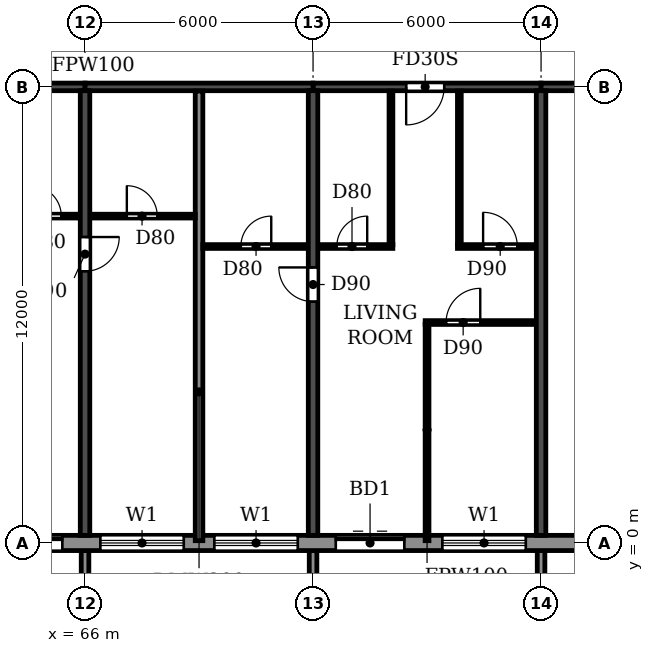
"""IFC4 building model, lengths in metres.
Left out: names, types, materials, properties, quantities, classifications, styles, units other than length and angle.
Written with IfcOpenShell. Run it as: python <this file> out.ifc"""

import sys

from ifc_helpers import new_model, si_unit, direction, frame, frame_2d, origin, place, context, subcontext, project, spatial, polyline, rectangle, outline, extrude, source, transform, mapped, element, fill, save


model = new_model("IFC4")
c1 = context("Model", 3, precision=1e-05, world=origin(), true_north=direction((0.0, 1.0)))
c2 = subcontext(c1, "Body", "Model", "MODEL_VIEW")
j1 = project(units=[si_unit("LENGTHUNIT", "METRE"), si_unit("PLANEANGLEUNIT", "RADIAN")], contexts=[c1])
p1 = place(None, origin())
s1 = spatial("IfcSite", under=j1, at=p1, CompositionType="ELEMENT")
p2 = place(p1, origin())
s2 = spatial("IfcBuilding", under=s1, at=p2, CompositionType="ELEMENT")
p3 = place(p2, frame((0.0, 0.0, 191.7)))
s3 = spatial("IfcBuildingStorey", under=s2, at=p3, CompositionType="ELEMENT", Elevation=191.7)
p4 = place(p3, frame((66.0, 0.2, 0.0), z_axis=(0.0, 0.0, 1.0), x_axis=(0.0, 1.0, 0.0)))
e1 = element("IfcWall", 1, at=p4, inside=s3, PredefinedType="SHEAR", context=c2, shape_type="SweptSolid", body=[
    extrude(rectangle(XDim=11.7, YDim=0.25, at=frame_2d((5.85, 0.0))), origin(), (0.0, 0.0, 1.0), 3.08),
])
p5 = place(p4, frame((6.95, 0.0, 0.0)))
e2 = element("IfcOpeningElement", 2, at=p5, cuts=e1, PredefinedType="OPENING", context=c2, shape_type="SweptSolid", body=[
    extrude(rectangle(XDim=0.9, YDim=2.1, at=frame_2d((0.45, 1.05))), frame((0.0, 0.135, 0.0), z_axis=(0.0, -1.0, 0.0), x_axis=(1.0, 0.0, 0.0)), (0.0, 0.0, 1.0), 0.27),
])
p6 = place(p3, frame((72.0, 0.2, 0.0), z_axis=(0.0, 0.0, 1.0), x_axis=(0.0, 1.0, 0.0)))
e3 = element("IfcWall", 3, at=p6, inside=s3, PredefinedType="SHEAR", context=c2, shape_type="SweptSolid", body=[
    extrude(rectangle(XDim=11.7, YDim=0.25, at=frame_2d((5.85, 0.0))), origin(), (0.0, 0.0, 1.0), 3.08),
])
p7 = place(p6, frame((6.15, 0.0, 0.0)))
e4 = element("IfcOpeningElement", 4, at=p7, cuts=e3, PredefinedType="OPENING", context=c2, shape_type="SweptSolid", body=[
    extrude(rectangle(XDim=0.9, YDim=2.1, at=frame_2d((0.45, 1.05))), frame((0.0, 0.135, 0.0), z_axis=(0.0, -1.0, 0.0), x_axis=(1.0, 0.0, 0.0)), (0.0, 0.0, 1.0), 0.27),
])
p8 = place(p3, frame((78.0, 0.2, 0.0), z_axis=(0.0, 0.0, 1.0), x_axis=(0.0, 1.0, 0.0)))
e5 = element("IfcWall", 5, at=p8, inside=s3, PredefinedType="SHEAR", context=c2, shape_type="SweptSolid", body=[
    extrude(rectangle(XDim=11.7, YDim=0.25, at=frame_2d((5.85, 0.0))), origin(), (0.0, 0.0, 1.0), 3.08),
])
p9 = place(p3, frame((60.0, 12.0, 0.0), z_axis=(0.0, 0.0, 1.0), x_axis=(1.0, 0.0, 0.0)))
e6 = element("IfcWall", 6, at=p9, inside=s3, PredefinedType="SHEAR", context=c2, shape_type="SweptSolid", body=[
    extrude(rectangle(XDim=6.0, YDim=0.2, at=frame_2d((3.0, 0.0))), origin(), (0.0, 0.0, 1.0), 2.48),
])
p10 = place(p9, frame((2.55, 0.0, 0.0)))
e7 = element("IfcOpeningElement", 7, at=p10, cuts=e6, PredefinedType="OPENING", context=c2, shape_type="SweptSolid", body=[
    extrude(rectangle(XDim=1.0, YDim=2.1, at=frame_2d((0.5, 1.05))), frame((0.0, 0.11, 0.0), z_axis=(0.0, -1.0, 0.0), x_axis=(1.0, 0.0, 0.0)), (0.0, 0.0, 1.0), 0.22),
])
p11 = place(p3, frame((66.0, 12.0, 0.0), z_axis=(0.0, 0.0, 1.0), x_axis=(1.0, 0.0, 0.0)))
e8 = element("IfcWall", 8, at=p11, inside=s3, PredefinedType="SHEAR", context=c2, shape_type="SweptSolid", body=[
    extrude(rectangle(XDim=6.0, YDim=0.2, at=frame_2d((3.0, 0.0))), origin(), (0.0, 0.0, 1.0), 2.48),
])
p12 = place(p3, frame((72.0, 12.0, 0.0), z_axis=(0.0, 0.0, 1.0), x_axis=(1.0, 0.0, 0.0)))
e9 = element("IfcWall", 9, at=p12, inside=s3, PredefinedType="SHEAR", context=c2, shape_type="SweptSolid", body=[
    extrude(rectangle(XDim=6.0, YDim=0.2, at=frame_2d((3.0, 0.0))), origin(), (0.0, 0.0, 1.0), 2.48),
])
p13 = place(p12, frame((2.45, 0.0, 0.0)))
e10 = element("IfcOpeningElement", 10, at=p13, cuts=e9, PredefinedType="OPENING", context=c2, shape_type="SweptSolid", body=[
    extrude(rectangle(XDim=1.0, YDim=2.1, at=frame_2d((0.5, 1.05))), frame((0.0, 0.11, 0.0), z_axis=(0.0, -1.0, 0.0), x_axis=(1.0, 0.0, 0.0)), (0.0, 0.0, 1.0), 0.22),
])
p14 = place(p3, frame((78.0, 12.0, 0.0), z_axis=(0.0, 0.0, 1.0), x_axis=(1.0, 0.0, 0.0)))
e11 = element("IfcWall", 11, at=p14, inside=s3, PredefinedType="SHEAR", context=c2, shape_type="SweptSolid", body=[
    extrude(rectangle(XDim=5.8, YDim=0.2, at=frame_2d((2.9, 0.0))), origin(), (0.0, 0.0, 1.0), 2.48),
])
p15 = place(p14, frame((2.5, 0.0, 0.0)))
e12 = element("IfcOpeningElement", 12, at=p15, cuts=e11, PredefinedType="OPENING", context=c2, shape_type="SweptSolid", body=[
    extrude(rectangle(XDim=1.0, YDim=2.1, at=frame_2d((0.5, 1.05))), frame((0.0, 0.11, 0.0), z_axis=(0.0, -1.0, 0.0), x_axis=(1.0, 0.0, 0.0)), (0.0, 0.0, 1.0), 0.22),
])
p16 = place(p3, frame((22.683, 0.0, 0.0), z_axis=(0.0, 0.0, 1.0), x_axis=(1.0, 0.0, 0.0)))
e13 = element("IfcWall", 13, at=p16, inside=s3, PredefinedType="STANDARD", context=c2, shape_type="SweptSolid", body=[
    extrude(rectangle(XDim=56.634, YDim=0.4, at=frame_2d((28.317, 0.0))), origin(), (0.0, 0.0, 1.0), 3.08),
])
p17 = place(p16, frame((1.717, 0.0, 0.9)))
e14 = element("IfcOpeningElement", 14, at=p17, cuts=e13, PredefinedType="OPENING", context=c2, shape_type="SweptSolid", body=[
    extrude(rectangle(XDim=2.2, YDim=1.5, at=frame_2d((1.1, 0.75))), frame((0.0, 0.21, 0.0), z_axis=(0.0, -1.0, 0.0), x_axis=(1.0, 0.0, 0.0)), (0.0, 0.0, 1.0), 0.42),
])
p18 = place(p16, frame((4.917, 0.0, 0.0)))
e15 = element("IfcOpeningElement", 15, at=p18, cuts=e13, PredefinedType="OPENING", context=c2, shape_type="SweptSolid", body=[
    extrude(rectangle(XDim=1.8, YDim=2.4, at=frame_2d((0.9, 1.2))), frame((0.0, 0.21, 0.0), z_axis=(0.0, -1.0, 0.0), x_axis=(1.0, 0.0, 0.0)), (0.0, 0.0, 1.0), 0.42),
])
p19 = place(p16, frame((7.717, 0.0, 0.9)))
e16 = element("IfcOpeningElement", 16, at=p19, cuts=e13, PredefinedType="OPENING", context=c2, shape_type="SweptSolid", body=[
    extrude(rectangle(XDim=2.2, YDim=1.5, at=frame_2d((1.1, 0.75))), frame((0.0, 0.21, 0.0), z_axis=(0.0, -1.0, 0.0), x_axis=(1.0, 0.0, 0.0)), (0.0, 0.0, 1.0), 0.42),
])
p20 = place(p16, frame((10.717, 0.0, 0.9)))
e17 = element("IfcOpeningElement", 17, at=p20, cuts=e13, PredefinedType="OPENING", context=c2, shape_type="SweptSolid", body=[
    extrude(rectangle(XDim=2.2, YDim=1.5, at=frame_2d((1.1, 0.75))), frame((0.0, 0.21, 0.0), z_axis=(0.0, -1.0, 0.0), x_axis=(1.0, 0.0, 0.0)), (0.0, 0.0, 1.0), 0.42),
])
p21 = place(p16, frame((13.717, 0.0, 0.9)))
e18 = element("IfcOpeningElement", 18, at=p21, cuts=e13, PredefinedType="OPENING", context=c2, shape_type="SweptSolid", body=[
    extrude(rectangle(XDim=2.2, YDim=1.5, at=frame_2d((1.1, 0.75))), frame((0.0, 0.21, 0.0), z_axis=(0.0, -1.0, 0.0), x_axis=(1.0, 0.0, 0.0)), (0.0, 0.0, 1.0), 0.42),
])
p22 = place(p16, frame((16.917, 0.0, 0.0)))
e19 = element("IfcOpeningElement", 19, at=p22, cuts=e13, PredefinedType="OPENING", context=c2, shape_type="SweptSolid", body=[
    extrude(rectangle(XDim=1.8, YDim=2.4, at=frame_2d((0.9, 1.2))), frame((0.0, 0.21, 0.0), z_axis=(0.0, -1.0, 0.0), x_axis=(1.0, 0.0, 0.0)), (0.0, 0.0, 1.0), 0.42),
])
p23 = place(p16, frame((19.717, 0.0, 0.9)))
e20 = element("IfcOpeningElement", 20, at=p23, cuts=e13, PredefinedType="OPENING", context=c2, shape_type="SweptSolid", body=[
    extrude(rectangle(XDim=2.2, YDim=1.5, at=frame_2d((1.1, 0.75))), frame((0.0, 0.21, 0.0), z_axis=(0.0, -1.0, 0.0), x_axis=(1.0, 0.0, 0.0)), (0.0, 0.0, 1.0), 0.42),
])
p24 = place(p16, frame((22.717, 0.0, 0.9)))
e21 = element("IfcOpeningElement", 21, at=p24, cuts=e13, PredefinedType="OPENING", context=c2, shape_type="SweptSolid", body=[
    extrude(rectangle(XDim=2.2, YDim=1.5, at=frame_2d((1.1, 0.75))), frame((0.0, 0.21, 0.0), z_axis=(0.0, -1.0, 0.0), x_axis=(1.0, 0.0, 0.0)), (0.0, 0.0, 1.0), 0.42),
])
p25 = place(p16, frame((25.917, 0.0, 0.0)))
e22 = element("IfcOpeningElement", 22, at=p25, cuts=e13, PredefinedType="OPENING", context=c2, shape_type="SweptSolid", body=[
    extrude(rectangle(XDim=1.8, YDim=2.4, at=frame_2d((0.9, 1.2))), frame((0.0, 0.21, 0.0), z_axis=(0.0, -1.0, 0.0), x_axis=(1.0, 0.0, 0.0)), (0.0, 0.0, 1.0), 0.42),
])
p26 = place(p16, frame((28.717, 0.0, 0.9)))
e23 = element("IfcOpeningElement", 23, at=p26, cuts=e13, PredefinedType="OPENING", context=c2, shape_type="SweptSolid", body=[
    extrude(rectangle(XDim=2.2, YDim=1.5, at=frame_2d((1.1, 0.75))), frame((0.0, 0.21, 0.0), z_axis=(0.0, -1.0, 0.0), x_axis=(1.0, 0.0, 0.0)), (0.0, 0.0, 1.0), 0.42),
])
p27 = place(p16, frame((31.717, 0.0, 0.9)))
e24 = element("IfcOpeningElement", 24, at=p27, cuts=e13, PredefinedType="OPENING", context=c2, shape_type="SweptSolid", body=[
    extrude(rectangle(XDim=2.2, YDim=1.5, at=frame_2d((1.1, 0.75))), frame((0.0, 0.21, 0.0), z_axis=(0.0, -1.0, 0.0), x_axis=(1.0, 0.0, 0.0)), (0.0, 0.0, 1.0), 0.42),
])
p28 = place(p16, frame((34.717, 0.0, 0.9)))
e25 = element("IfcOpeningElement", 25, at=p28, cuts=e13, PredefinedType="OPENING", context=c2, shape_type="SweptSolid", body=[
    extrude(rectangle(XDim=2.2, YDim=1.5, at=frame_2d((1.1, 0.75))), frame((0.0, 0.21, 0.0), z_axis=(0.0, -1.0, 0.0), x_axis=(1.0, 0.0, 0.0)), (0.0, 0.0, 1.0), 0.42),
])
p29 = place(p16, frame((37.717, 0.0, 0.9)))
e26 = element("IfcOpeningElement", 26, at=p29, cuts=e13, PredefinedType="OPENING", context=c2, shape_type="SweptSolid", body=[
    extrude(rectangle(XDim=2.2, YDim=1.5, at=frame_2d((1.1, 0.75))), frame((0.0, 0.21, 0.0), z_axis=(0.0, -1.0, 0.0), x_axis=(1.0, 0.0, 0.0)), (0.0, 0.0, 1.0), 0.42),
])
p30 = place(p16, frame((40.917, 0.0, 0.0)))
e27 = element("IfcOpeningElement", 27, at=p30, cuts=e13, PredefinedType="OPENING", context=c2, shape_type="SweptSolid", body=[
    extrude(rectangle(XDim=1.8, YDim=2.4, at=frame_2d((0.9, 1.2))), frame((0.0, 0.21, 0.0), z_axis=(0.0, -1.0, 0.0), x_axis=(1.0, 0.0, 0.0)), (0.0, 0.0, 1.0), 0.42),
])
p31 = place(p16, frame((43.717, 0.0, 0.9)))
e28 = element("IfcOpeningElement", 28, at=p31, cuts=e13, PredefinedType="OPENING", context=c2, shape_type="SweptSolid", body=[
    extrude(rectangle(XDim=2.2, YDim=1.5, at=frame_2d((1.1, 0.75))), frame((0.0, 0.21, 0.0), z_axis=(0.0, -1.0, 0.0), x_axis=(1.0, 0.0, 0.0)), (0.0, 0.0, 1.0), 0.42),
])
p32 = place(p16, frame((46.717, 0.0, 0.9)))
e29 = element("IfcOpeningElement", 29, at=p32, cuts=e13, PredefinedType="OPENING", context=c2, shape_type="SweptSolid", body=[
    extrude(rectangle(XDim=2.2, YDim=1.5, at=frame_2d((1.1, 0.75))), frame((0.0, 0.21, 0.0), z_axis=(0.0, -1.0, 0.0), x_axis=(1.0, 0.0, 0.0)), (0.0, 0.0, 1.0), 0.42),
])
p33 = place(p16, frame((49.917, 0.0, 0.0)))
e30 = element("IfcOpeningElement", 30, at=p33, cuts=e13, PredefinedType="OPENING", context=c2, shape_type="SweptSolid", body=[
    extrude(rectangle(XDim=1.8, YDim=2.4, at=frame_2d((0.9, 1.2))), frame((0.0, 0.21, 0.0), z_axis=(0.0, -1.0, 0.0), x_axis=(1.0, 0.0, 0.0)), (0.0, 0.0, 1.0), 0.42),
])
p34 = place(p16, frame((52.717, 0.0, 0.9)))
e31 = element("IfcOpeningElement", 31, at=p34, cuts=e13, PredefinedType="OPENING", context=c2, shape_type="SweptSolid", body=[
    extrude(rectangle(XDim=2.2, YDim=1.5, at=frame_2d((1.1, 0.75))), frame((0.0, 0.21, 0.0), z_axis=(0.0, -1.0, 0.0), x_axis=(1.0, 0.0, 0.0)), (0.0, 0.0, 1.0), 0.42),
])
m1 = source(origin(), c2, "Body", "SweptSolid", [
    extrude(outline(polyline([(0.0, 0.0), (0.2, 0.0), (0.2, 1.65), (0.0, 1.65), (0.0, 0.0)])), origin(), (0.0, 0.0, 1.0), 3.1),
])
for number, where in (
    (32, (65.9, -1.85, 0.0)),
    (33, (71.9, -1.85, 0.0)),
    (34, (77.9, -1.85, 0.0)),
):
    element("IfcWall", number, at=place(p3, frame(where)), inside=s3, PredefinedType="STANDARD", context=c2, shape_type="MappedRepresentation", body=[
        mapped(m1, transform((0.0, 0.0, 0.0))),
    ])
p35 = place(p3, frame((69.0, 0.06, 0.0), z_axis=(0.0, 0.0, 1.0), x_axis=(0.0, 1.0, 0.0)))
e35 = element("IfcWall", 35, at=p35, inside=s3, PredefinedType="PARTITIONING", context=c2, shape_type="SweptSolid", body=[
    extrude(rectangle(XDim=11.83, YDim=0.2, at=frame_2d((5.915, 0.0))), origin(), (0.0, 0.0, 1.0), 3.08),
])
p36 = place(p3, frame((74.95, 5.8, 0.0), z_axis=(0.0, 0.0, 1.0), x_axis=(1.0, 0.0, 0.0)))
e36 = element("IfcWall", 36, at=p36, inside=s3, PredefinedType="PARTITIONING", context=c2, shape_type="SweptSolid", body=[
    extrude(rectangle(XDim=2.915, YDim=0.1, at=frame_2d((1.458, 0.0))), origin(), (0.0, 0.0, 1.0), 3.08),
])
p37 = place(p36, frame((0.55, 0.0, 0.0)))
e37 = element("IfcOpeningElement", 37, at=p37, cuts=e36, PredefinedType="OPENING", context=c2, shape_type="SweptSolid", body=[
    extrude(rectangle(XDim=0.9, YDim=2.1, at=frame_2d((0.45, 1.05))), frame((0.0, 0.06, 0.0), z_axis=(0.0, -1.0, 0.0), x_axis=(1.0, 0.0, 0.0)), (0.0, 0.0, 1.0), 0.12),
])
p38 = place(p3, frame((69.1, 7.8, 0.0), z_axis=(0.0, 0.0, 1.0), x_axis=(1.0, 0.0, 0.0)))
e38 = element("IfcWall", 38, at=p38, inside=s3, PredefinedType="PARTITIONING", context=c2, shape_type="SweptSolid", body=[
    extrude(rectangle(XDim=2.765, YDim=0.1, at=frame_2d((1.382, 0.0))), origin(), (0.0, 0.0, 1.0), 3.08),
])
p39 = place(p38, frame((1.0, 0.0, 0.0)))
e39 = element("IfcOpeningElement", 39, at=p39, cuts=e38, PredefinedType="OPENING", context=c2, shape_type="SweptSolid", body=[
    extrude(rectangle(XDim=0.8, YDim=2.1, at=frame_2d((0.4, 1.05))), frame((0.0, 0.06, 0.0), z_axis=(0.0, -1.0, 0.0), x_axis=(1.0, 0.0, 0.0)), (0.0, 0.0, 1.0), 0.12),
])
p40 = place(p3, frame((72.135, 7.8, 0.0), z_axis=(0.0, 0.0, 1.0), x_axis=(1.0, 0.0, 0.0)))
e40 = element("IfcWall", 40, at=p40, inside=s3, PredefinedType="PARTITIONING", context=c2, shape_type="SweptSolid", body=[
    extrude(rectangle(XDim=1.965, YDim=0.1, at=frame_2d((0.982, 0.0))), origin(), (0.0, 0.0, 1.0), 3.08),
])
p41 = place(p40, frame((0.49, 0.0, 0.0)))
e41 = element("IfcOpeningElement", 41, at=p41, cuts=e40, PredefinedType="OPENING", context=c2, shape_type="SweptSolid", body=[
    extrude(rectangle(XDim=0.8, YDim=2.1, at=frame_2d((0.4, 1.05))), frame((0.0, 0.06, 0.0), z_axis=(0.0, -1.0, 0.0), x_axis=(1.0, 0.0, 0.0)), (0.0, 0.0, 1.0), 0.12),
])
p42 = place(p3, frame((75.8, 7.8, 0.0), z_axis=(0.0, 0.0, 1.0), x_axis=(1.0, 0.0, 0.0)))
e42 = element("IfcWall", 42, at=p42, inside=s3, PredefinedType="PARTITIONING", context=c2, shape_type="SweptSolid", body=[
    extrude(rectangle(XDim=2.065, YDim=0.1, at=frame_2d((1.032, 0.0))), origin(), (0.0, 0.0, 1.0), 3.08),
])
p43 = place(p42, frame((0.675, 0.0, 0.0)))
e43 = element("IfcOpeningElement", 43, at=p43, cuts=e42, PredefinedType="OPENING", context=c2, shape_type="SweptSolid", body=[
    extrude(rectangle(XDim=0.9, YDim=2.1, at=frame_2d((0.45, 1.05))), frame((0.0, 0.06, 0.0), z_axis=(0.0, -1.0, 0.0), x_axis=(1.0, 0.0, 0.0)), (0.0, 0.0, 1.0), 0.12),
])
p44 = place(p3, frame((63.9, 8.6, 0.0), z_axis=(0.0, 0.0, 1.0), x_axis=(1.0, 0.0, 0.0)))
e44 = element("IfcWall", 44, at=p44, inside=s3, PredefinedType="PARTITIONING", context=c2, shape_type="SweptSolid", body=[
    extrude(rectangle(XDim=1.965, YDim=0.1, at=frame_2d((0.982, 0.0))), origin(), (0.0, 0.0, 1.0), 3.08),
])
p45 = place(p44, frame((0.675, 0.0, 0.0)))
e45 = element("IfcOpeningElement", 45, at=p45, cuts=e44, PredefinedType="OPENING", context=c2, shape_type="SweptSolid", body=[
    extrude(rectangle(XDim=0.8, YDim=2.1, at=frame_2d((0.4, 1.05))), frame((0.0, 0.06, 0.0), z_axis=(0.0, -1.0, 0.0), x_axis=(1.0, 0.0, 0.0)), (0.0, 0.0, 1.0), 0.12),
])
p46 = place(p3, frame((66.135, 8.6, 0.0), z_axis=(0.0, 0.0, 1.0), x_axis=(1.0, 0.0, 0.0)))
e46 = element("IfcWall", 46, at=p46, inside=s3, PredefinedType="PARTITIONING", context=c2, shape_type="SweptSolid", body=[
    extrude(rectangle(XDim=2.765, YDim=0.1, at=frame_2d((1.382, 0.0))), origin(), (0.0, 0.0, 1.0), 3.08),
])
p47 = place(p46, frame((0.965, 0.0, 0.0)))
e47 = element("IfcOpeningElement", 47, at=p47, cuts=e46, PredefinedType="OPENING", context=c2, shape_type="SweptSolid", body=[
    extrude(rectangle(XDim=0.8, YDim=2.1, at=frame_2d((0.4, 1.05))), frame((0.0, 0.06, 0.0), z_axis=(0.0, -1.0, 0.0), x_axis=(1.0, 0.0, 0.0)), (0.0, 0.0, 1.0), 0.12),
])
p48 = place(p3, frame((74.05, 7.85, 0.0), z_axis=(0.0, 0.0, 1.0), x_axis=(0.0, 1.0, 0.0)))
e48 = element("IfcWall", 48, at=p48, inside=s3, PredefinedType="PARTITIONING", context=c2, shape_type="SweptSolid", body=[
    extrude(rectangle(XDim=4.04, YDim=0.1, at=frame_2d((2.02, 0.0))), origin(), (0.0, 0.0, 1.0), 3.08),
])
p49 = place(p3, frame((75.0, 0.06, 0.0), z_axis=(0.0, 0.0, 1.0), x_axis=(0.0, 1.0, 0.0)))
e49 = element("IfcWall", 49, at=p49, inside=s3, PredefinedType="PARTITIONING", context=c2, shape_type="SweptSolid", body=[
    extrude(rectangle(XDim=5.69, YDim=0.1, at=frame_2d((2.845, 0.0))), origin(), (0.0, 0.0, 1.0), 3.08),
])
p50 = place(p3, frame((75.85, 7.85, 0.0), z_axis=(0.0, 0.0, 1.0), x_axis=(0.0, 1.0, 0.0)))
e50 = element("IfcWall", 50, at=p50, inside=s3, PredefinedType="PARTITIONING", context=c2, shape_type="SweptSolid", body=[
    extrude(rectangle(XDim=4.04, YDim=0.1, at=frame_2d((2.02, 0.0))), origin(), (0.0, 0.0, 1.0), 3.08),
])
p51 = place(p30, origin())
e51 = element("IfcDoor", 51, at=p51, inside=s3, OperationType="DOUBLE_DOOR_SLIDING", PredefinedType="DOOR", context=c2, shape_type="SweptSolid", body=[
    extrude(rectangle(XDim=1.8, YDim=2.4, at=frame_2d((0.9, 1.2))), frame((0.0, 0.025, 0.0), z_axis=(0.0, -1.0, 0.0), x_axis=(1.0, 0.0, 0.0)), (0.0, 0.0, 1.0), 0.05),
])
fill(e27, e51)
p52 = place(p31, origin())
e52 = element("IfcWindow", 52, at=p52, inside=s3, PartitioningType="DOUBLE_PANEL_HORIZONTAL", PredefinedType="WINDOW", context=c2, shape_type="SweptSolid", body=[
    extrude(rectangle(XDim=2.2, YDim=1.5, at=frame_2d((1.1, 0.75))), frame((0.0, 0.03, 0.0), z_axis=(0.0, -1.0, 0.0), x_axis=(1.0, 0.0, 0.0)), (0.0, 0.0, 1.0), 0.06),
])
fill(e28, e52)
p53 = place(p32, origin())
e53 = element("IfcWindow", 53, at=p53, inside=s3, PartitioningType="DOUBLE_PANEL_HORIZONTAL", PredefinedType="WINDOW", context=c2, shape_type="SweptSolid", body=[
    extrude(rectangle(XDim=2.2, YDim=1.5, at=frame_2d((1.1, 0.75))), frame((0.0, 0.03, 0.0), z_axis=(0.0, -1.0, 0.0), x_axis=(1.0, 0.0, 0.0)), (0.0, 0.0, 1.0), 0.06),
])
fill(e29, e53)
p54 = place(p33, origin())
e54 = element("IfcDoor", 54, at=p54, inside=s3, OperationType="DOUBLE_DOOR_SLIDING", PredefinedType="DOOR", context=c2, shape_type="SweptSolid", body=[
    extrude(rectangle(XDim=1.8, YDim=2.4, at=frame_2d((0.9, 1.2))), frame((0.0, 0.025, 0.0), z_axis=(0.0, -1.0, 0.0), x_axis=(1.0, 0.0, 0.0)), (0.0, 0.0, 1.0), 0.05),
])
fill(e30, e54)
p55 = place(p34, origin())
e55 = element("IfcWindow", 55, at=p55, inside=s3, PartitioningType="DOUBLE_PANEL_HORIZONTAL", PredefinedType="WINDOW", context=c2, shape_type="SweptSolid", body=[
    extrude(rectangle(XDim=2.2, YDim=1.5, at=frame_2d((1.1, 0.75))), frame((0.0, 0.03, 0.0), z_axis=(0.0, -1.0, 0.0), x_axis=(1.0, 0.0, 0.0)), (0.0, 0.0, 1.0), 0.06),
])
fill(e31, e55)
p56 = place(p47, origin())
e56 = element("IfcDoor", 56, at=p56, inside=s3, OperationType="SINGLE_SWING_LEFT", PredefinedType="DOOR", context=c2, shape_type="SweptSolid", body=[
    extrude(rectangle(XDim=0.8, YDim=2.1, at=frame_2d((0.4, 1.05))), frame((0.0, 0.025, 0.0), z_axis=(0.0, -1.0, 0.0), x_axis=(1.0, 0.0, 0.0)), (0.0, 0.0, 1.0), 0.05),
])
fill(e47, e56)
p57 = place(p45, origin())
e57 = element("IfcDoor", 57, at=p57, inside=s3, OperationType="SINGLE_SWING_LEFT", PredefinedType="DOOR", context=c2, shape_type="SweptSolid", body=[
    extrude(rectangle(XDim=0.8, YDim=2.1, at=frame_2d((0.4, 1.05))), frame((0.0, 0.025, 0.0), z_axis=(0.0, -1.0, 0.0), x_axis=(1.0, 0.0, 0.0)), (0.0, 0.0, 1.0), 0.05),
])
fill(e45, e57)
p58 = place(p5, frame((0.9, 0.0, 0.0), z_axis=(0.0, 0.0, 1.0), x_axis=(-1.0, 0.0, 0.0)))
e58 = element("IfcDoor", 58, at=p58, inside=s3, OperationType="SINGLE_SWING_LEFT", PredefinedType="DOOR", context=c2, shape_type="SweptSolid", body=[
    extrude(rectangle(XDim=0.9, YDim=2.1, at=frame_2d((0.45, 1.05))), frame((0.0, 0.025, 0.0), z_axis=(0.0, -1.0, 0.0), x_axis=(1.0, 0.0, 0.0)), (0.0, 0.0, 1.0), 0.05),
])
fill(e2, e58)
p59 = place(p39, origin())
e59 = element("IfcDoor", 59, at=p59, inside=s3, OperationType="SINGLE_SWING_RIGHT", PredefinedType="DOOR", context=c2, shape_type="SweptSolid", body=[
    extrude(rectangle(XDim=0.8, YDim=2.1, at=frame_2d((0.4, 1.05))), frame((0.0, 0.025, 0.0), z_axis=(0.0, -1.0, 0.0), x_axis=(1.0, 0.0, 0.0)), (0.0, 0.0, 1.0), 0.05),
])
fill(e39, e59)
p60 = place(p7, origin())
e60 = element("IfcDoor", 60, at=p60, inside=s3, OperationType="SINGLE_SWING_RIGHT", PredefinedType="DOOR", context=c2, shape_type="SweptSolid", body=[
    extrude(rectangle(XDim=0.9, YDim=2.1, at=frame_2d((0.45, 1.05))), frame((0.0, 0.025, 0.0), z_axis=(0.0, -1.0, 0.0), x_axis=(1.0, 0.0, 0.0)), (0.0, 0.0, 1.0), 0.05),
])
fill(e4, e60)
p61 = place(p41, origin())
e61 = element("IfcDoor", 61, at=p61, inside=s3, OperationType="SINGLE_SWING_RIGHT", PredefinedType="DOOR", context=c2, shape_type="SweptSolid", body=[
    extrude(rectangle(XDim=0.8, YDim=2.1, at=frame_2d((0.4, 1.05))), frame((0.0, 0.025, 0.0), z_axis=(0.0, -1.0, 0.0), x_axis=(1.0, 0.0, 0.0)), (0.0, 0.0, 1.0), 0.05),
])
fill(e41, e61)
p62 = place(p13, frame((1.0, 0.0, 0.0), z_axis=(0.0, 0.0, 1.0), x_axis=(-1.0, 0.0, 0.0)))
e62 = element("IfcDoor", 62, at=p62, inside=s3, OperationType="SINGLE_SWING_RIGHT", PredefinedType="DOOR", context=c2, shape_type="SweptSolid", body=[
    extrude(rectangle(XDim=1.0, YDim=2.1, at=frame_2d((0.5, 1.05))), frame((0.0, 0.025, 0.0), z_axis=(0.0, -1.0, 0.0), x_axis=(1.0, 0.0, 0.0)), (0.0, 0.0, 1.0), 0.05),
])
fill(e10, e62)
p63 = place(p37, origin())
e63 = element("IfcDoor", 63, at=p63, inside=s3, OperationType="SINGLE_SWING_RIGHT", PredefinedType="DOOR", context=c2, shape_type="SweptSolid", body=[
    extrude(rectangle(XDim=0.9, YDim=2.1, at=frame_2d((0.45, 1.05))), frame((0.0, 0.025, 0.0), z_axis=(0.0, -1.0, 0.0), x_axis=(1.0, 0.0, 0.0)), (0.0, 0.0, 1.0), 0.05),
])
fill(e37, e63)
p64 = place(p43, origin())
e64 = element("IfcDoor", 64, at=p64, inside=s3, OperationType="SINGLE_SWING_LEFT", PredefinedType="DOOR", context=c2, shape_type="SweptSolid", body=[
    extrude(rectangle(XDim=0.9, YDim=2.1, at=frame_2d((0.45, 1.05))), frame((0.0, 0.025, 0.0), z_axis=(0.0, -1.0, 0.0), x_axis=(1.0, 0.0, 0.0)), (0.0, 0.0, 1.0), 0.05),
])
fill(e43, e64)
save(model, sys.argv[1])
